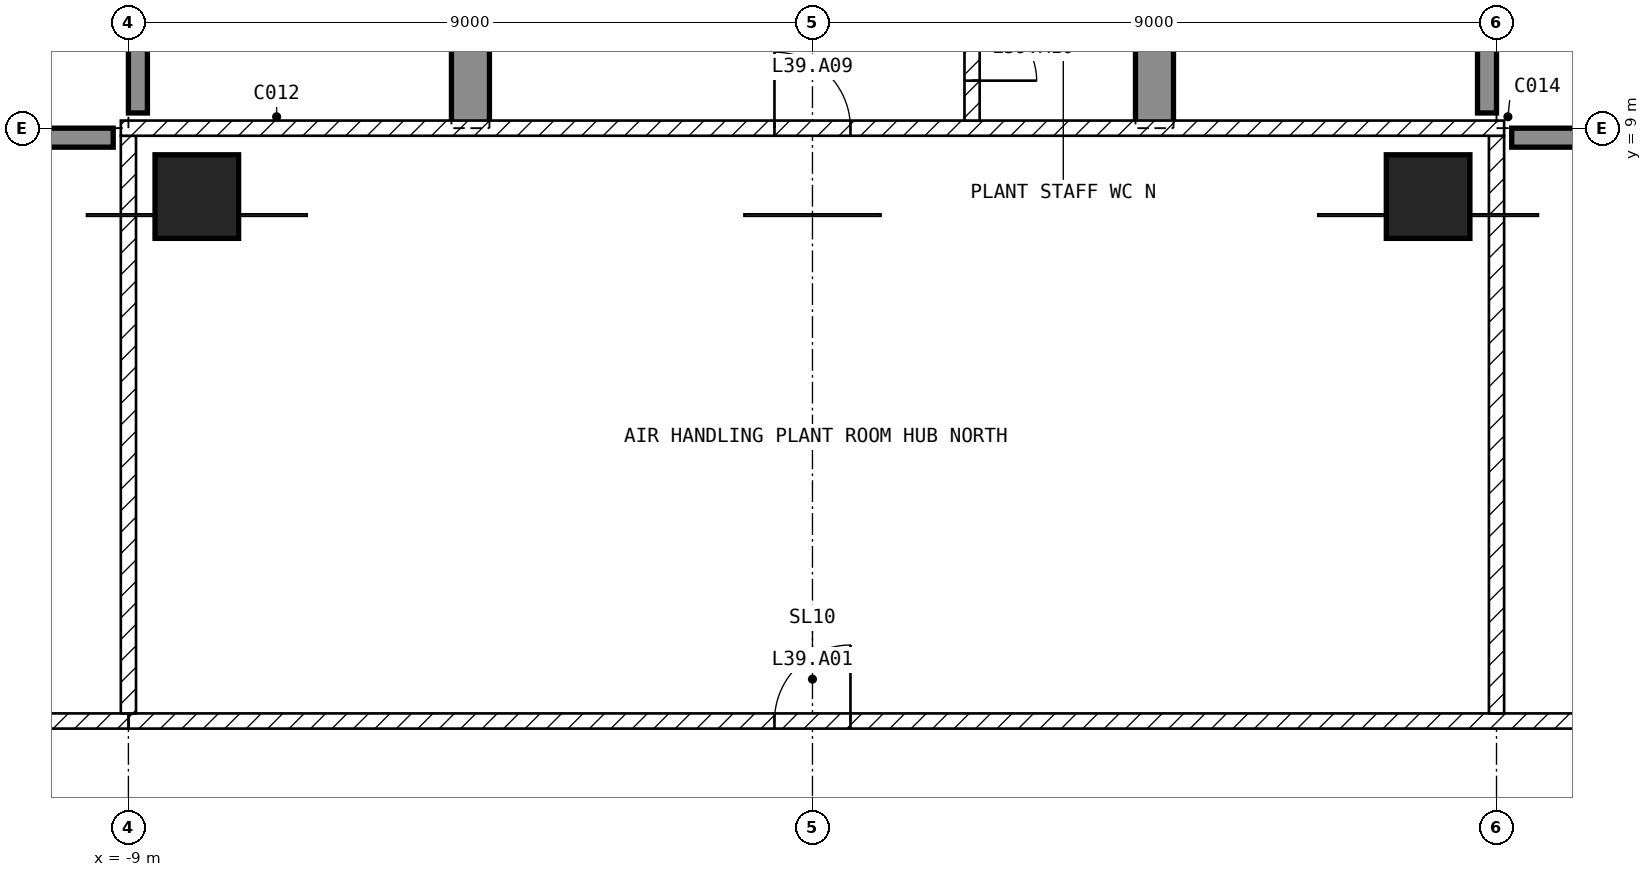
"""IFC4 building model, lengths in metres.
Left out: names, types, materials, properties, quantities, classifications, styles, units other than length and angle.
Written with IfcOpenShell. Run it as: python <this file> out.ifc"""

import sys

from ifc_helpers import new_model, si_unit, direction, frame, frame_2d, origin, origin_2d, place, context, subcontext, project, spatial, polyline, rectangle, outline, extrude, element, fill, save


model = new_model("IFC4")
c1 = context("Model", 3, precision=1e-05, world=origin(), true_north=direction((0.0, 1.0)))
c2 = subcontext(c1, "Body", "Model", "MODEL_VIEW")
j1 = project(units=[si_unit("LENGTHUNIT", "METRE"), si_unit("PLANEANGLEUNIT", "RADIAN")], contexts=[c1])
p1 = place(None, origin())
s1 = spatial("IfcSite", under=j1, at=p1, CompositionType="ELEMENT")
p2 = place(p1, origin())
s2 = spatial("IfcBuilding", under=s1, at=p2, CompositionType="ELEMENT")
p3 = place(p2, frame((0.0, 0.0, 162.1)))
s3 = spatial("IfcBuildingStorey", under=s2, at=p3, CompositionType="ELEMENT", Elevation=162.1)
for number, where, z_axis, x_axis in (
    (1, (-8.1, 8.1, -0.45), (0.0, 0.0, 1.0), (1.0, 0.0, 0.0)),
    (2, (8.1, 8.1, -0.45), (0.0, 0.0, 1.0), (1.0, 0.0, 0.0)),
):
    element("IfcColumn", number, at=place(p3, frame(where, z_axis=z_axis, x_axis=x_axis)), inside=s3, PredefinedType="COLUMN", context=c2, shape_type="SweptSolid", body=[
        extrude(rectangle(XDim=1.1, YDim=1.1, at=origin_2d()), origin(), (0.0, 0.0, 1.0), 4.7),
    ])
for number, where, z_axis, x_axis in (
    (3, (-4.75, 9.0, -0.45), (1.0, 0.0, 0.0), (0.0, 1.0, 0.0)),
    (4, (4.25, 9.0, -0.45), (1.0, 0.0, 0.0), (0.0, 1.0, 0.0)),
):
    element("IfcWall", number, at=place(p3, frame(where, z_axis=z_axis, x_axis=x_axis)), inside=s3, PredefinedType="SHEAR", context=c2, shape_type="SweptSolid", body=[
        extrude(outline(polyline([(0.0, 0.0), (2.1, 0.0), (2.1, 2.85), (4.5, 2.85), (4.5, 0.0), (9.9, 0.0), (9.9, 2.85), (12.3, 2.85), (12.3, 0.0), (16.2, 0.0), (16.2, 4.7), (0.0, 4.7), (0.0, 0.0)])), origin(), (0.0, 0.0, 1.0), 0.5),
    ])
p4 = place(p3, frame((17.8, 8.875, 0.0), z_axis=(0.0, 0.0, 1.0), x_axis=(-1.0, 0.0, 0.0)))
e5 = element("IfcWall", 5, at=p4, inside=s3, PredefinedType="SOLIDWALL", context=c2, shape_type="SweptSolid", body=[
    extrude(rectangle(XDim=8.6, YDim=0.25, at=frame_2d((4.3, 0.0))), origin(), (0.0, 0.0, 1.0), 4.25),
])
p5 = place(p3, frame((8.875, 9.2, 0.0), z_axis=(0.0, 0.0, 1.0), x_axis=(0.0, 1.0, 0.0)))
e6 = element("IfcWall", 6, at=p5, inside=s3, PredefinedType="SOLIDWALL", context=c2, shape_type="SweptSolid", body=[
    extrude(rectangle(XDim=8.6, YDim=0.25, at=frame_2d((4.3, 0.0))), origin(), (0.0, 0.0, 1.0), 4.25),
])
p6 = place(p5, frame((2.8, 0.0, 1.0)))
e7 = element("IfcOpeningElement", 7, at=p6, cuts=e6, PredefinedType="OPENING", context=c2, shape_type="SweptSolid", body=[
    extrude(rectangle(XDim=3.0, YDim=2.4, at=frame_2d((1.5, 1.2))), frame((0.0, 0.135, 0.0), z_axis=(0.0, -1.0, 0.0), x_axis=(1.0, 0.0, 0.0)), (0.0, 0.0, 1.0), 0.27),
])
p7 = place(p3, frame((-8.875, 17.8, 0.0), z_axis=(0.0, 0.0, 1.0), x_axis=(0.0, -1.0, 0.0)))
e8 = element("IfcWall", 8, at=p7, inside=s3, PredefinedType="SOLIDWALL", context=c2, shape_type="SweptSolid", body=[
    extrude(rectangle(XDim=8.6, YDim=0.25, at=frame_2d((4.3, 0.0))), origin(), (0.0, 0.0, 1.0), 4.25),
])
p8 = place(p7, frame((2.8, 0.0, 1.0)))
e9 = element("IfcOpeningElement", 9, at=p8, cuts=e8, PredefinedType="OPENING", context=c2, shape_type="SweptSolid", body=[
    extrude(rectangle(XDim=3.0, YDim=2.4, at=frame_2d((1.5, 1.2))), frame((0.0, 0.135, 0.0), z_axis=(0.0, -1.0, 0.0), x_axis=(1.0, 0.0, 0.0)), (0.0, 0.0, 1.0), 0.27),
])
p9 = place(p3, frame((-9.2, 8.875, 0.0), z_axis=(0.0, 0.0, 1.0), x_axis=(-1.0, 0.0, 0.0)))
e10 = element("IfcWall", 10, at=p9, inside=s3, PredefinedType="SOLIDWALL", context=c2, shape_type="SweptSolid", body=[
    extrude(rectangle(XDim=8.6, YDim=0.25, at=frame_2d((4.3, 0.0))), origin(), (0.0, 0.0, 1.0), 4.25),
])
p10 = place(p3, frame((-9.0, 1.2, 0.0), z_axis=(0.0, 0.0, 1.0), x_axis=(1.0, 0.0, 0.0)))
e11 = element("IfcWall", 11, at=p10, inside=s3, PredefinedType="PARTITIONING", context=c2, shape_type="SweptSolid", body=[
    extrude(rectangle(XDim=30.6, YDim=0.2, at=frame_2d((15.3, 0.0))), origin(), (0.0, 0.0, 1.0), 4.25),
])
p11 = place(p10, frame((8.5, 0.0, 0.0)))
e12 = element("IfcOpeningElement", 12, at=p11, cuts=e11, PredefinedType="OPENING", context=c2, shape_type="SweptSolid", body=[
    extrude(rectangle(XDim=1.0, YDim=2.1, at=frame_2d((0.5, 1.05))), frame((0.0, 0.11, 0.0), z_axis=(0.0, -1.0, 0.0), x_axis=(1.0, 0.0, 0.0)), (0.0, 0.0, 1.0), 0.22),
])
p12 = place(p10, frame((21.4, 0.0, 0.0)))
e13 = element("IfcOpeningElement", 13, at=p12, cuts=e11, PredefinedType="OPENING", context=c2, shape_type="SweptSolid", body=[
    extrude(rectangle(XDim=1.0, YDim=2.1, at=frame_2d((0.5, 1.05))), frame((0.0, 0.11, 0.0), z_axis=(0.0, -1.0, 0.0), x_axis=(1.0, 0.0, 0.0)), (0.0, 0.0, 1.0), 0.22),
])
p13 = place(p10, frame((27.35, 0.0, 0.0)))
e14 = element("IfcOpeningElement", 14, at=p13, cuts=e11, PredefinedType="OPENING", context=c2, shape_type="SweptSolid", body=[
    extrude(rectangle(XDim=1.0, YDim=2.1, at=frame_2d((0.5, 1.05))), frame((0.0, 0.11, 0.0), z_axis=(0.0, -1.0, 0.0), x_axis=(1.0, 0.0, 0.0)), (0.0, 0.0, 1.0), 0.22),
])
p14 = place(p3, frame((-21.6, 1.2, 0.0), z_axis=(0.0, 0.0, 1.0), x_axis=(1.0, 0.0, 0.0)))
e15 = element("IfcWall", 15, at=p14, inside=s3, PredefinedType="PARTITIONING", context=c2, shape_type="SweptSolid", body=[
    extrude(rectangle(XDim=12.6, YDim=0.2, at=frame_2d((6.3, 0.0))), origin(), (0.0, 0.0, 1.0), 4.25),
])
p15 = place(p14, frame((5.75, 0.0, 0.0)))
e16 = element("IfcOpeningElement", 16, at=p15, cuts=e15, PredefinedType="OPENING", context=c2, shape_type="SweptSolid", body=[
    extrude(rectangle(XDim=1.1, YDim=2.1, at=frame_2d((0.55, 1.05))), frame((0.0, 0.11, 0.0), z_axis=(0.0, -1.0, 0.0), x_axis=(1.0, 0.0, 0.0)), (0.0, 0.0, 1.0), 0.22),
])
for number, where, z_axis, x_axis in (
    (17, (9.0, 8.9, 0.0), (0.0, 0.0, 1.0), (0.0, -1.0, 0.0)),
    (18, (-9.0, 1.3, 0.0), (0.0, 0.0, 1.0), (0.0, 1.0, 0.0)),
):
    element("IfcWall", number, at=place(p3, frame(where, z_axis=z_axis, x_axis=x_axis)), inside=s3, PredefinedType="PARTITIONING", context=c2, shape_type="SweptSolid", body=[
        extrude(rectangle(XDim=7.6, YDim=0.2, at=frame_2d((3.8, 0.0))), origin(), (0.0, 0.0, 1.0), 4.25),
    ])
p16 = place(p3, frame((-9.1, 9.0, 0.0), z_axis=(0.0, 0.0, 1.0), x_axis=(1.0, 0.0, 0.0)))
e19 = element("IfcWall", 19, at=p16, inside=s3, PredefinedType="PARTITIONING", context=c2, shape_type="SweptSolid", body=[
    extrude(rectangle(XDim=18.2, YDim=0.2, at=frame_2d((9.1, 0.0))), origin(), (0.0, 0.0, 1.0), 4.25),
])
p17 = place(p16, frame((8.6, 0.0, 0.0)))
e20 = element("IfcOpeningElement", 20, at=p17, cuts=e19, PredefinedType="OPENING", context=c2, shape_type="SweptSolid", body=[
    extrude(rectangle(XDim=1.0, YDim=2.1, at=frame_2d((0.5, 1.05))), frame((0.0, 0.11, 0.0), z_axis=(0.0, -1.0, 0.0), x_axis=(1.0, 0.0, 0.0)), (0.0, 0.0, 1.0), 0.22),
])
p18 = place(p3, frame((2.1, 11.0, 0.0), z_axis=(0.0, 0.0, 1.0), x_axis=(0.0, -1.0, 0.0)))
e21 = element("IfcWall", 21, at=p18, inside=s3, PredefinedType="PARTITIONING", context=c2, shape_type="SweptSolid", body=[
    extrude(rectangle(XDim=1.9, YDim=0.2, at=frame_2d((0.95, 0.0))), origin(), (0.0, 0.0, 1.0), 4.25),
])
p19 = place(p18, frame((0.525, 0.0, 0.0)))
e22 = element("IfcOpeningElement", 22, at=p19, cuts=e21, PredefinedType="OPENING", context=c2, shape_type="SweptSolid", body=[
    extrude(rectangle(XDim=0.85, YDim=2.1, at=frame_2d((0.425, 1.05))), frame((0.0, 0.11, 0.0), z_axis=(0.0, -1.0, 0.0), x_axis=(1.0, 0.0, 0.0)), (0.0, 0.0, 1.0), 0.22),
])
p20 = place(p11, origin())
e23 = element("IfcDoor", 23, at=p20, inside=s3, OperationType="SINGLE_SWING_RIGHT", PredefinedType="DOOR", context=c2, shape_type="SweptSolid", body=[
    extrude(rectangle(XDim=1.0, YDim=2.1, at=frame_2d((0.5, 1.05))), frame((0.0, 0.025, 0.0), z_axis=(0.0, -1.0, 0.0), x_axis=(1.0, 0.0, 0.0)), (0.0, 0.0, 1.0), 0.05),
])
fill(e12, e23)
p21 = place(p17, origin())
e24 = element("IfcDoor", 24, at=p21, inside=s3, OperationType="SINGLE_SWING_LEFT", PredefinedType="DOOR", context=c2, shape_type="SweptSolid", body=[
    extrude(rectangle(XDim=1.0, YDim=2.1, at=frame_2d((0.5, 1.05))), frame((0.0, 0.025, 0.0), z_axis=(0.0, -1.0, 0.0), x_axis=(1.0, 0.0, 0.0)), (0.0, 0.0, 1.0), 0.05),
])
fill(e20, e24)
p22 = place(p19, origin())
e25 = element("IfcDoor", 25, at=p22, inside=s3, OperationType="SINGLE_SWING_RIGHT", PredefinedType="DOOR", context=c2, shape_type="SweptSolid", body=[
    extrude(rectangle(XDim=0.85, YDim=2.1, at=frame_2d((0.425, 1.05))), frame((0.0, 0.025, 0.0), z_axis=(0.0, -1.0, 0.0), x_axis=(1.0, 0.0, 0.0)), (0.0, 0.0, 1.0), 0.05),
])
fill(e22, e25)
save(model, sys.argv[1])
